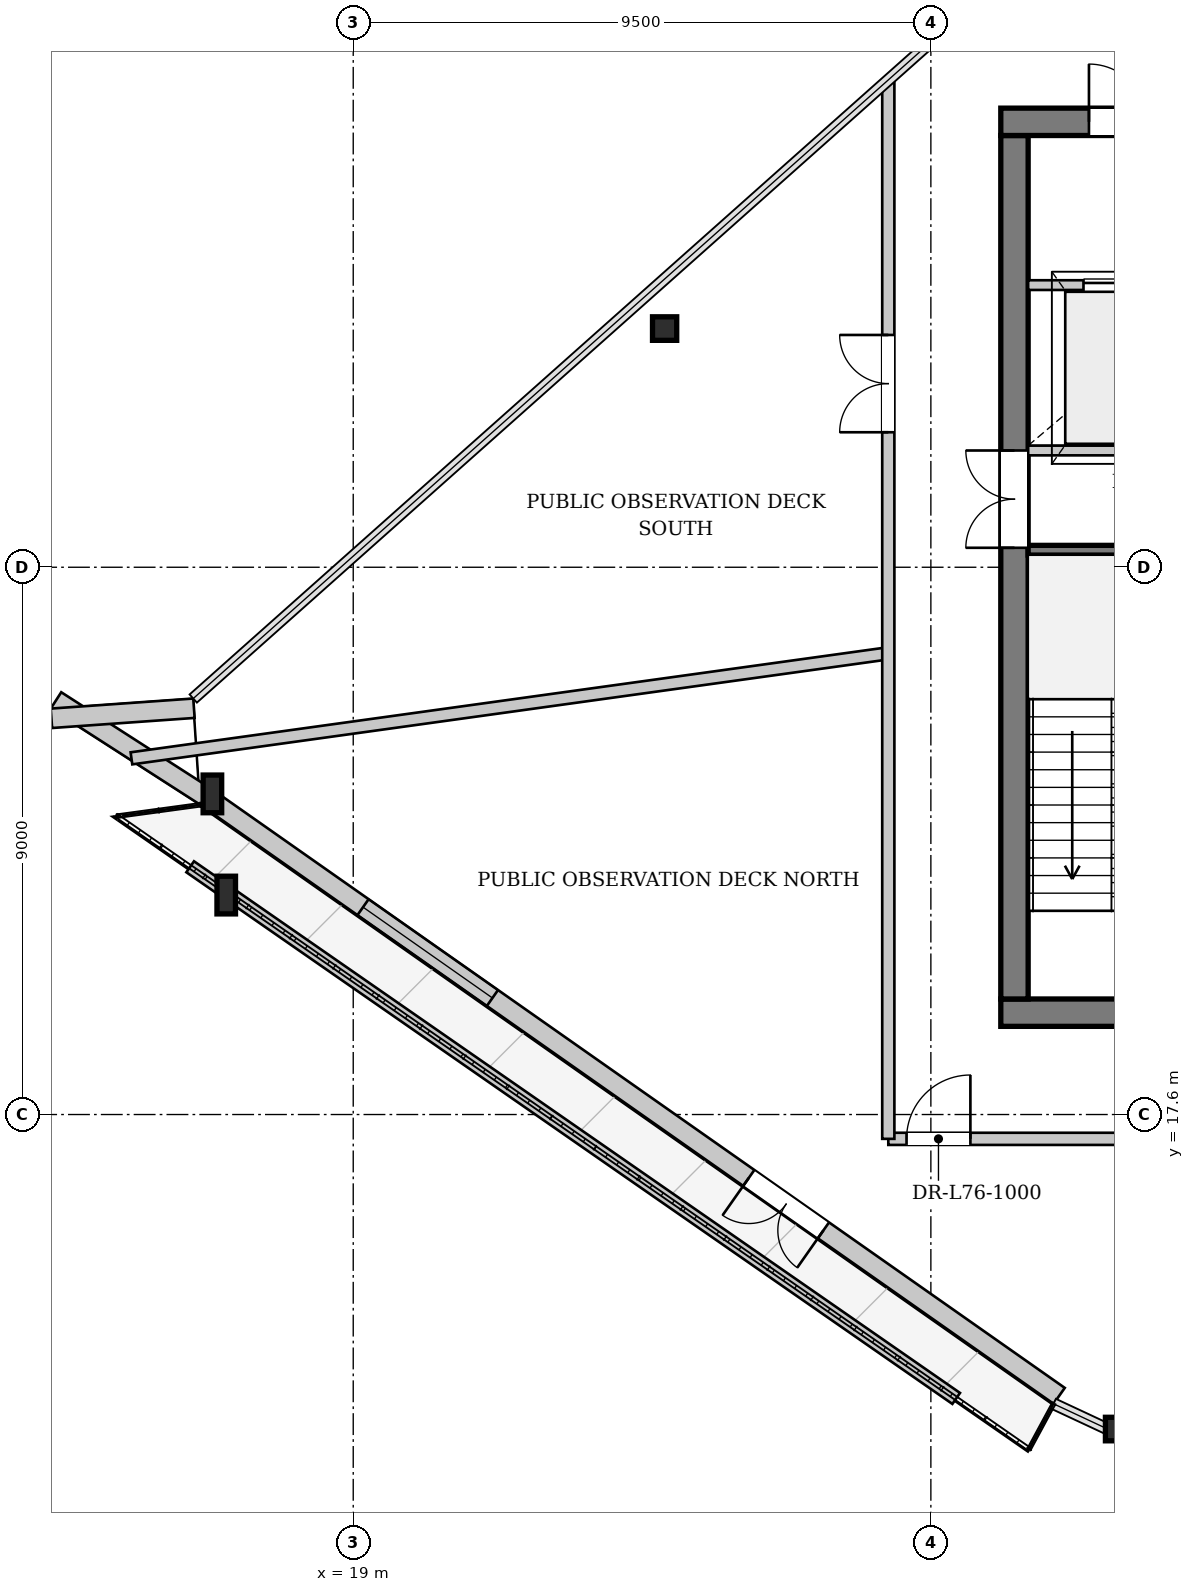
"""IFC4 building model, lengths in metres.
Left out: names, types, materials, properties, quantities, classifications, styles, units other than length and angle.
Written with IfcOpenShell. Run it as: python <this file> out.ifc"""

import sys

from ifc_helpers import new_model, si_unit, direction, frame, frame_2d, origin, origin_2d, place, context, subcontext, project, spatial, rectangle, i_section, extrude, source, transform, mapped, element, fill, save


model = new_model("IFC4")
c1 = context("Model", 3, precision=1e-05, world=origin(), true_north=direction((0.0, 1.0)))
c2 = subcontext(c1, "Body", "Model", "MODEL_VIEW")
j1 = project(units=[si_unit("LENGTHUNIT", "METRE"), si_unit("PLANEANGLEUNIT", "RADIAN")], contexts=[c1])
p1 = place(None, origin())
s1 = spatial("IfcSite", under=j1, at=p1, CompositionType="ELEMENT")
p2 = place(p1, origin())
s2 = spatial("IfcBuilding", under=s1, at=p2, CompositionType="ELEMENT")
p3 = place(p2, frame((0.0, 0.0, 286.1)))
s3 = spatial("IfcBuildingStorey", under=s2, at=p3, CompositionType="ELEMENT", Elevation=286.1)
m1 = source(origin(), c2, "Body", "SweptSolid", [
    extrude(i_section(OverallWidth=0.398, OverallDepth=0.387, WebThickness=0.019, FlangeThickness=0.029, at=origin_2d()), origin(), (0.0, 0.0, 1.0), 4.655),
])
p4 = place(p3, frame((24.373, 31.564, 0.0), z_axis=(-0.108142364501, -0.446415037164, 0.88826732665), x_axis=(0.971889702975, -0.235436626825, 0.0)))
e1 = element("IfcColumn", 1, at=p4, inside=s3, PredefinedType="COLUMN", context=c2, shape_type="MappedRepresentation", body=[
    mapped(m1, transform((0.0, 0.0, 0.0), x_axis=(1.0, 0.0, 0.0), y_axis=(0.0, 1.0, 0.0), z_axis=(0.0, 0.0, 1.0), scale=1.0)),
])
m2 = source(origin(), c2, "Body", "SweptSolid", [
    extrude(i_section(OverallWidth=0.305, OverallDepth=0.62, WebThickness=0.021, FlangeThickness=0.04, at=origin_2d()), origin(), (0.0, 0.0, 1.0), 5.228),
])
p5 = place(p3, frame((16.369, 24.441, 0.0), z_axis=(0.120474601347, -0.599991532056, 0.790883070935), x_axis=(0.980430716793, 0.196864444651, 0.0)))
e2 = element("IfcColumn", 2, at=p5, inside=s3, PredefinedType="COLUMN", context=c2, shape_type="MappedRepresentation", body=[
    mapped(m2, transform((0.0, 0.0, 0.0), x_axis=(1.0, 0.0, 0.0), y_axis=(0.0, 1.0, 0.0), z_axis=(0.0, 0.0, 1.0), scale=1.0)),
])
m3 = source(origin(), c2, "Body", "SweptSolid", [
    extrude(i_section(OverallWidth=0.305, OverallDepth=0.62, WebThickness=0.021, FlangeThickness=0.04, at=origin_2d()), origin(), (0.0, 0.0, 1.0), 5.161),
])
p6 = place(p3, frame((16.485, 22.693, 0.0), z_axis=(0.165134400152, -0.575203181279, 0.801169102083), x_axis=(0.96117418541, 0.275942358657, 0.0)))
e3 = element("IfcColumn", 3, at=p6, inside=s3, PredefinedType="COLUMN", context=c2, shape_type="MappedRepresentation", body=[
    mapped(m3, transform((0.0, 0.0, 0.0), x_axis=(1.0, 0.0, 0.0), y_axis=(0.0, 1.0, 0.0), z_axis=(0.0, 0.0, 1.0), scale=1.0)),
])
m4 = source(origin(), c2, "Body", "SweptSolid", [
    extrude(i_section(OverallWidth=0.398, OverallDepth=0.387, WebThickness=0.019, FlangeThickness=0.029, at=origin_2d()), origin(), (0.0, 0.0, 1.0), 4.713),
])
p7 = place(p3, frame((30.518, 12.843, 0.0), z_axis=(0.446241604847, -0.176134369222, 0.877408179858), x_axis=(0.367141948921, 0.930164925883, 0.0)))
e4 = element("IfcColumn", 4, at=p7, inside=s3, PredefinedType="COLUMN", context=c2, shape_type="MappedRepresentation", body=[
    mapped(m4, transform((0.0, 0.0, 0.0), x_axis=(1.0, 0.0, 0.0), y_axis=(0.0, 1.0, 0.0), z_axis=(0.0, 0.0, 1.0), scale=1.0)),
])
p8 = place(p3, frame((30.61, 12.974, 0.0), z_axis=(0.0, 0.0, 1.0), x_axis=(-0.818470582771, 0.57454843585, 0.0)))
e5 = element("IfcWall", 5, at=p8, inside=s3, PredefinedType="SOLIDWALL", context=c2, shape_type="SweptSolid", body=[
    extrude(rectangle(XDim=17.145, YDim=0.32, at=frame_2d((8.573, 0.0))), origin(), (0.0, 0.0, 1.0), 3.662),
])
p9 = place(p8, frame((4.737, 0.0, 0.0)))
e6 = element("IfcOpeningElement", 6, at=p9, cuts=e5, PredefinedType="OPENING", context=c2, shape_type="SweptSolid", body=[
    extrude(rectangle(XDim=1.5, YDim=2.3, at=frame_2d((0.75, 1.15))), frame((0.0, 0.17, 0.0), z_axis=(0.0, -1.0, 0.0), x_axis=(1.0, 0.0, 0.0)), (0.0, 0.0, 1.0), 0.34),
])
p10 = place(p8, frame((11.388, 0.0, 0.65)))
e7 = element("IfcOpeningElement", 7, at=p10, cuts=e5, PredefinedType="OPENING", context=c2, shape_type="SweptSolid", body=[
    extrude(rectangle(XDim=2.6, YDim=2.35, at=frame_2d((1.3, 1.175))), frame((0.0, 0.17, 0.0), z_axis=(0.0, -1.0, 0.0), x_axis=(1.0, 0.0, 0.0)), (0.0, 0.0, 1.0), 0.34),
])
p11 = place(p3, frame((16.572, 22.828, 0.0), z_axis=(0.0, 0.0, 1.0), x_axis=(-0.841091692127, 0.540892563671, 0.0)))
e8 = element("IfcWall", 8, at=p11, inside=s3, PredefinedType="SOLIDWALL", context=c2, shape_type="SweptSolid", body=[
    extrude(rectangle(XDim=2.925, YDim=0.32, at=frame_2d((1.463, 0.0))), origin(), (0.0, 0.0, 1.0), 3.662),
])
p12 = place(p3, frame((14.036, 24.116, 0.0), z_axis=(0.0, 0.0, 1.0), x_axis=(0.997516376818, 0.070434920171, 0.0)))
e9 = element("IfcWall", 9, at=p12, inside=s3, PredefinedType="SOLIDWALL", context=c2, shape_type="SweptSolid", body=[
    extrude(rectangle(XDim=2.35, YDim=0.32, at=frame_2d((1.175, 0.0))), origin(), (0.0, 0.0, 1.0), 3.662),
])
p13 = place(p3, frame((16.318, 21.674, 0.0), z_axis=(0.0, 0.0, 1.0), x_axis=(0.821531955781, -0.570162473012, 0.0)))
e10 = element("IfcWall", 10, at=p13, inside=s3, PredefinedType="PARAPET", context=c2, shape_type="SweptSolid", body=[
    extrude(rectangle(XDim=15.335, YDim=0.22, at=frame_2d((7.667, 0.0))), origin(), (0.0, 0.0, 1.0), 0.3),
])
p14 = place(p3, frame((46.35, 19.275, 0.0), z_axis=(0.0, 0.0, 1.0), x_axis=(-1.0, 0.0, 0.0)))
e11 = element("IfcWall", 11, at=p14, inside=s3, PredefinedType="SHEAR", context=c2, shape_type="SweptSolid", body=[
    extrude(rectangle(XDim=16.7, YDim=0.45, at=frame_2d((8.35, 0.0))), origin(), (0.0, 0.0, 1.0), 4.12),
])
p15 = place(p14, frame((4.55, 0.0, 0.0)))
e12 = element("IfcOpeningElement", 12, at=p15, cuts=e11, PredefinedType="OPENING", context=c2, shape_type="SweptSolid", body=[
    extrude(rectangle(XDim=1.12, YDim=2.25, at=frame_2d((0.56, 1.125))), frame((0.0, 0.235, 0.0), z_axis=(0.0, -1.0, 0.0), x_axis=(1.0, 0.0, 0.0)), (0.0, 0.0, 1.0), 0.47),
])
p16 = place(p14, frame((11.05, 0.0, 0.0)))
e13 = element("IfcOpeningElement", 13, at=p16, cuts=e11, PredefinedType="OPENING", context=c2, shape_type="SweptSolid", body=[
    extrude(rectangle(XDim=1.12, YDim=2.25, at=frame_2d((0.56, 1.125))), frame((0.0, 0.235, 0.0), z_axis=(0.0, -1.0, 0.0), x_axis=(1.0, 0.0, 0.0)), (0.0, 0.0, 1.0), 0.47),
])
p17 = place(p3, frame((29.875, 19.5, 0.0), z_axis=(0.0, 0.0, 1.0), x_axis=(0.0, 1.0, 0.0)))
e14 = element("IfcWall", 14, at=p17, inside=s3, PredefinedType="SHEAR", context=c2, shape_type="SweptSolid", body=[
    extrude(rectangle(XDim=14.2, YDim=0.45, at=frame_2d((7.1, 0.0))), origin(), (0.0, 0.0, 1.0), 4.12),
])
p18 = place(p17, frame((7.42, 0.0, 0.0)))
e15 = element("IfcOpeningElement", 15, at=p18, cuts=e14, PredefinedType="OPENING", context=c2, shape_type="SweptSolid", body=[
    extrude(rectangle(XDim=1.6, YDim=2.2, at=frame_2d((0.8, 1.1))), frame((0.0, 0.235, 0.0), z_axis=(0.0, -1.0, 0.0), x_axis=(1.0, 0.0, 0.0)), (0.0, 0.0, 1.0), 0.47),
])
p19 = place(p3, frame((29.65, 33.925, 0.0), z_axis=(0.0, 0.0, 1.0), x_axis=(1.0, 0.0, 0.0)))
e16 = element("IfcWall", 16, at=p19, inside=s3, PredefinedType="SHEAR", context=c2, shape_type="SweptSolid", body=[
    extrude(rectangle(XDim=16.7, YDim=0.45, at=frame_2d((8.35, 0.0))), origin(), (0.0, 0.0, 1.0), 4.12),
])
p20 = place(p19, frame((1.45, 0.0, 0.0)))
e17 = element("IfcOpeningElement", 17, at=p20, cuts=e16, PredefinedType="OPENING", context=c2, shape_type="SweptSolid", body=[
    extrude(rectangle(XDim=0.95, YDim=2.1, at=frame_2d((0.475, 1.05))), frame((0.0, 0.235, 0.0), z_axis=(0.0, -1.0, 0.0), x_axis=(1.0, 0.0, 0.0)), (0.0, 0.0, 1.0), 0.47),
])
p21 = place(p19, frame((3.83, 0.0, 0.0)))
e18 = element("IfcOpeningElement", 18, at=p21, cuts=e16, PredefinedType="OPENING", context=c2, shape_type="SweptSolid", body=[
    extrude(rectangle(XDim=1.32, YDim=2.2, at=frame_2d((0.66, 1.1))), frame((0.0, 0.235, 0.0), z_axis=(0.0, -1.0, 0.0), x_axis=(1.0, 0.0, 0.0)), (0.0, 0.0, 1.0), 0.47),
])
for number, where, z_axis, x_axis in (
    (19, (30.1, 26.88, 0.0), (0.0, 0.0, 1.0), (1.0, 0.0, 0.0)),
    (20, (30.1, 28.52, 0.0), (0.0, 0.0, 1.0), (1.0, 0.0, 0.0)),
):
    element("IfcWall", number, at=place(p3, frame(where, z_axis=z_axis, x_axis=x_axis)), inside=s3, PredefinedType="PARTITIONING", context=c2, shape_type="SweptSolid", body=[
        extrude(rectangle(XDim=3.02, YDim=0.16, at=frame_2d((1.51, 0.0))), origin(), (0.0, 0.0, 1.0), 4.12),
    ])
p22 = place(p3, frame((30.1, 31.24, 0.0), z_axis=(0.0, 0.0, 1.0), x_axis=(1.0, 0.0, 0.0)))
e21 = element("IfcWall", 21, at=p22, inside=s3, PredefinedType="PARTITIONING", context=c2, shape_type="SweptSolid", body=[
    extrude(rectangle(XDim=3.02, YDim=0.16, at=frame_2d((1.51, 0.0))), origin(), (0.0, 0.0, 1.0), 4.12),
])
p23 = place(p22, frame((0.91, 0.0, 0.0)))
e22 = element("IfcOpeningElement", 22, at=p23, cuts=e21, PredefinedType="OPENING", context=c2, shape_type="SweptSolid", body=[
    extrude(rectangle(XDim=1.2, YDim=2.2, at=frame_2d((0.6, 1.1))), frame((0.0, 0.09, 0.0), z_axis=(0.0, -1.0, 0.0), x_axis=(1.0, 0.0, 0.0)), (0.0, 0.0, 1.0), 0.18),
])
p24 = place(p3, frame((27.8, 25.185, 0.0), z_axis=(0.0, 0.0, 1.0), x_axis=(-0.990511455739, -0.137430186092, 0.0)))
e23 = element("IfcWall", 23, at=p24, inside=s3, PredefinedType="PARTITIONING", context=c2, shape_type="SweptSolid", body=[
    extrude(rectangle(XDim=12.567, YDim=0.2, at=frame_2d((6.283, 0.0))), origin(), (0.0, 0.0, 1.0), 4.12),
])
p25 = place(p3, frame((27.8, 17.2, 0.0), z_axis=(0.0, 0.0, 1.0), x_axis=(1.0, 0.0, 0.0)))
e24 = element("IfcWall", 24, at=p25, inside=s3, PredefinedType="PARTITIONING", context=c2, shape_type="SweptSolid", body=[
    extrude(rectangle(XDim=20.4, YDim=0.2, at=frame_2d((10.2, 0.0))), origin(), (0.0, 0.0, 1.0), 3.865),
])
p26 = place(p25, frame((0.3, 0.0, 0.0)))
e25 = element("IfcOpeningElement", 25, at=p26, cuts=e24, PredefinedType="OPENING", context=c2, shape_type="SweptSolid", body=[
    extrude(rectangle(XDim=1.05, YDim=2.2, at=frame_2d((0.525, 1.1))), frame((0.0, 0.11, 0.0), z_axis=(0.0, -1.0, 0.0), x_axis=(1.0, 0.0, 0.0)), (0.0, 0.0, 1.0), 0.22),
])
p27 = place(p25, frame((15.101, 0.0, 0.0)))
e26 = element("IfcOpeningElement", 26, at=p27, cuts=e24, PredefinedType="OPENING", context=c2, shape_type="SweptSolid", body=[
    extrude(rectangle(XDim=1.05, YDim=2.2, at=frame_2d((0.525, 1.1))), frame((0.0, 0.11, 0.0), z_axis=(0.0, -1.0, 0.0), x_axis=(1.0, 0.0, 0.0)), (0.0, 0.0, 1.0), 0.22),
])
p28 = place(p3, frame((27.8, 17.2, 0.0), z_axis=(0.0, 0.0, 1.0), x_axis=(0.0, 1.0, 0.0)))
e27 = element("IfcWall", 27, at=p28, inside=s3, PredefinedType="PARTITIONING", context=c2, shape_type="SweptSolid", body=[
    extrude(rectangle(XDim=17.374, YDim=0.2, at=frame_2d((8.687, 0.0))), origin(), (0.0, 0.0, 1.0), 4.12),
])
p29 = place(p28, frame((11.62, 0.0, 0.0)))
e28 = element("IfcOpeningElement", 28, at=p29, cuts=e27, PredefinedType="OPENING", context=c2, shape_type="SweptSolid", body=[
    extrude(rectangle(XDim=1.6, YDim=2.2, at=frame_2d((0.8, 1.1))), frame((0.0, 0.11, 0.0), z_axis=(0.0, -1.0, 0.0), x_axis=(1.0, 0.0, 0.0)), (0.0, 0.0, 1.0), 0.22),
])
m5 = source(origin(), c2, "Body", "SweptSolid", [
    extrude(rectangle(XDim=1.5, YDim=2.3, at=frame_2d((0.75, 1.15))), frame((0.0, 0.025, 0.0), z_axis=(0.0, -1.0, 0.0), x_axis=(1.0, 0.0, 0.0)), (0.0, 0.0, 1.0), 0.05),
])
p30 = place(p9, origin())
e29 = element("IfcDoor", 29, at=p30, inside=s3, OperationType="DOUBLE_DOOR_SINGLE_SWING", PredefinedType="DOOR", context=c2, shape_type="MappedRepresentation", body=[
    mapped(m5, transform((0.0, 0.0, 0.0), x_axis=(1.0, 0.0, 0.0), y_axis=(0.0, 1.0, 0.0), z_axis=(0.0, 0.0, 1.0), scale=1.0)),
])
fill(e6, e29)
m6 = source(origin(), c2, "Body", "SweptSolid", [
    extrude(rectangle(XDim=2.6, YDim=2.35, at=frame_2d((1.3, 1.175))), frame((0.0, 0.03, 0.0), z_axis=(0.0, -1.0, 0.0), x_axis=(1.0, 0.0, 0.0)), (0.0, 0.0, 1.0), 0.06),
])
p31 = place(p10, origin())
e30 = element("IfcWindow", 30, at=p31, inside=s3, PartitioningType="SINGLE_PANEL", PredefinedType="WINDOW", context=c2, shape_type="MappedRepresentation", body=[
    mapped(m6, transform((0.0, 0.0, 0.0), x_axis=(1.0, 0.0, 0.0), y_axis=(0.0, 1.0, 0.0), z_axis=(0.0, 0.0, 1.0), scale=1.0)),
])
fill(e7, e30)
m7 = source(origin(), c2, "Body", "SweptSolid", [
    extrude(rectangle(XDim=1.6, YDim=2.2, at=frame_2d((0.8, 1.1))), frame((0.0, 0.025, 0.0), z_axis=(0.0, -1.0, 0.0), x_axis=(1.0, 0.0, 0.0)), (0.0, 0.0, 1.0), 0.05),
])
p32 = place(p18, origin())
e31 = element("IfcDoor", 31, at=p32, inside=s3, OperationType="DOUBLE_DOOR_SINGLE_SWING", PredefinedType="DOOR", context=c2, shape_type="MappedRepresentation", body=[
    mapped(m7, transform((0.0, 0.0, 0.0), x_axis=(1.0, 0.0, 0.0), y_axis=(0.0, 1.0, 0.0), z_axis=(0.0, 0.0, 1.0), scale=1.0)),
])
fill(e15, e31)
m8 = source(origin(), c2, "Body", "SweptSolid", [
    extrude(rectangle(XDim=0.95, YDim=2.1, at=frame_2d((0.475, 1.05))), frame((0.0, 0.025, 0.0), z_axis=(0.0, -1.0, 0.0), x_axis=(1.0, 0.0, 0.0)), (0.0, 0.0, 1.0), 0.05),
])
p33 = place(p20, origin())
e32 = element("IfcDoor", 32, at=p33, inside=s3, OperationType="SINGLE_SWING_LEFT", PredefinedType="DOOR", context=c2, shape_type="MappedRepresentation", body=[
    mapped(m8, transform((0.0, 0.0, 0.0), x_axis=(1.0, 0.0, 0.0), y_axis=(0.0, 1.0, 0.0), z_axis=(0.0, 0.0, 1.0), scale=1.0)),
])
fill(e17, e32)
m9 = source(origin(), c2, "Body", "SweptSolid", [
    extrude(rectangle(XDim=1.2, YDim=2.2, at=frame_2d((0.6, 1.1))), frame((0.0, 0.025, 0.0), z_axis=(0.0, -1.0, 0.0), x_axis=(1.0, 0.0, 0.0)), (0.0, 0.0, 1.0), 0.05),
])
p34 = place(p23, origin())
e33 = element("IfcDoor", 33, at=p34, inside=s3, OperationType="DOUBLE_DOOR_SLIDING", PredefinedType="DOOR", context=c2, shape_type="MappedRepresentation", body=[
    mapped(m9, transform((0.0, 0.0, 0.0), x_axis=(1.0, 0.0, 0.0), y_axis=(0.0, 1.0, 0.0), z_axis=(0.0, 0.0, 1.0), scale=1.0)),
])
fill(e22, e33)
m10 = source(origin(), c2, "Body", "SweptSolid", [
    extrude(rectangle(XDim=1.05, YDim=2.2, at=frame_2d((0.525, 1.1))), frame((0.0, 0.025, 0.0), z_axis=(0.0, -1.0, 0.0), x_axis=(1.0, 0.0, 0.0)), (0.0, 0.0, 1.0), 0.05),
])
p35 = place(p26, origin())
e34 = element("IfcDoor", 34, at=p35, inside=s3, OperationType="SINGLE_SWING_RIGHT", PredefinedType="DOOR", context=c2, shape_type="MappedRepresentation", body=[
    mapped(m10, transform((0.0, 0.0, 0.0), x_axis=(1.0, 0.0, 0.0), y_axis=(0.0, 1.0, 0.0), z_axis=(0.0, 0.0, 1.0), scale=1.0)),
])
fill(e25, e34)
p36 = place(p29, origin())
e35 = element("IfcDoor", 35, at=p36, inside=s3, OperationType="DOUBLE_DOOR_SINGLE_SWING", PredefinedType="DOOR", context=c2, shape_type="MappedRepresentation", body=[
    mapped(m7, transform((0.0, 0.0, 0.0), x_axis=(1.0, 0.0, 0.0), y_axis=(0.0, 1.0, 0.0), z_axis=(0.0, 0.0, 1.0), scale=1.0)),
])
fill(e28, e35)
save(model, sys.argv[1])
